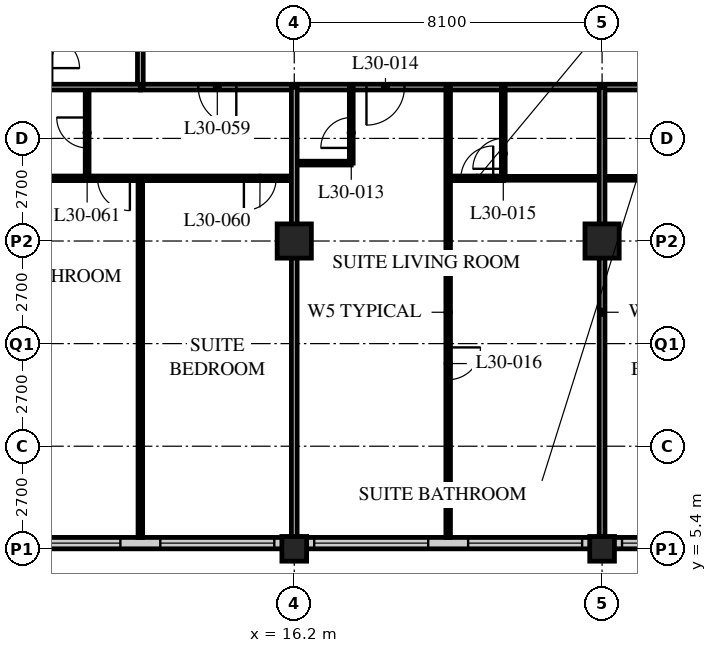
"""IFC4 building model, lengths in metres.
Left out: names, types, materials, properties, quantities, classifications, styles, units other than length and angle.
Written with IfcOpenShell. Run it as: python <this file> out.ifc"""

import sys

from ifc_helpers import new_model, si_unit, direction, frame, frame_2d, origin, origin_2d, place, context, subcontext, project, spatial, rectangle, hollow_rectangle, extrude, element, fill, save


model = new_model("IFC4")
c1 = context("Model", 3, precision=1e-05, world=origin(), true_north=direction((0.0, 1.0)))
c2 = subcontext(c1, "Body", "Model", "MODEL_VIEW")
j1 = project(units=[si_unit("LENGTHUNIT", "METRE"), si_unit("PLANEANGLEUNIT", "RADIAN")], contexts=[c1])
p1 = place(None, origin())
s1 = spatial("IfcSite", under=j1, at=p1, CompositionType="ELEMENT")
p2 = place(p1, origin())
s2 = spatial("IfcBuilding", under=s1, at=p2, CompositionType="ELEMENT")
p3 = place(p2, frame((0.0, 0.0, 120.4)))
s3 = spatial("IfcBuildingStorey", under=s2, at=p3, CompositionType="ELEMENT", Elevation=120.4)
p4 = place(p3, frame((16.2, 5.4, 0.0), z_axis=(0.0, 0.0, 1.0), x_axis=(1.0, 0.0, 0.0)))
e1 = element("IfcColumn", 1, at=p4, inside=s3, PredefinedType="COLUMN", context=c2, shape_type="SweptSolid", body=[
    extrude(hollow_rectangle(XDim=0.65, YDim=0.65, WallThickness=0.055, at=origin_2d()), origin(), (0.0, 0.0, 1.0), 3.4),
])
p5 = place(p3, frame((16.2, 13.5, 0.0), z_axis=(0.0, 0.0, 1.0), x_axis=(1.0, 0.0, 0.0)))
e2 = element("IfcColumn", 2, at=p5, inside=s3, PredefinedType="COLUMN", context=c2, shape_type="SweptSolid", body=[
    extrude(hollow_rectangle(XDim=0.9, YDim=0.9, WallThickness=0.09, at=origin_2d()), origin(), (0.0, 0.0, 1.0), 3.4),
])
p6 = place(p3, frame((24.3, 5.4, 0.0), z_axis=(0.0, 0.0, 1.0), x_axis=(1.0, 0.0, 0.0)))
e3 = element("IfcColumn", 3, at=p6, inside=s3, PredefinedType="COLUMN", context=c2, shape_type="SweptSolid", body=[
    extrude(hollow_rectangle(XDim=0.65, YDim=0.65, WallThickness=0.055, at=origin_2d()), origin(), (0.0, 0.0, 1.0), 3.4),
])
p7 = place(p3, frame((24.3, 13.5, 0.0), z_axis=(0.0, 0.0, 1.0), x_axis=(1.0, 0.0, 0.0)))
e4 = element("IfcColumn", 4, at=p7, inside=s3, PredefinedType="COLUMN", context=c2, shape_type="SweptSolid", body=[
    extrude(hollow_rectangle(XDim=0.9, YDim=0.9, WallThickness=0.09, at=origin_2d()), origin(), (0.0, 0.0, 1.0), 3.4),
])
p8 = place(p3, frame((8.4, 5.55, 0.0), z_axis=(0.0, 0.0, 1.0), x_axis=(1.0, 0.0, 0.0)))
e5 = element("IfcWall", 5, at=p8, inside=s3, PredefinedType="SOLIDWALL", context=c2, shape_type="SweptSolid", body=[
    extrude(rectangle(XDim=40.2, YDim=0.3, at=frame_2d((20.1, 0.0))), origin(), (0.0, 0.0, 1.0), 3.19),
])
p9 = place(p8, frame((0.225, 0.0, 0.9)))
e6 = element("IfcOpeningElement", 6, at=p9, cuts=e5, PredefinedType="OPENING", context=c2, shape_type="SweptSolid", body=[
    extrude(rectangle(XDim=3.0, YDim=2.0, at=frame_2d((1.5, 1.0))), frame((0.0, 0.16, 0.0), z_axis=(0.0, -1.0, 0.0), x_axis=(1.0, 0.0, 0.0)), (0.0, 0.0, 1.0), 0.32),
])
p10 = place(p8, frame((4.275, 0.0, 0.9)))
e7 = element("IfcOpeningElement", 7, at=p10, cuts=e5, PredefinedType="OPENING", context=c2, shape_type="SweptSolid", body=[
    extrude(rectangle(XDim=3.0, YDim=2.0, at=frame_2d((1.5, 1.0))), frame((0.0, 0.16, 0.0), z_axis=(0.0, -1.0, 0.0), x_axis=(1.0, 0.0, 0.0)), (0.0, 0.0, 1.0), 0.32),
])
p11 = place(p8, frame((8.325, 0.0, 0.9)))
e8 = element("IfcOpeningElement", 8, at=p11, cuts=e5, PredefinedType="OPENING", context=c2, shape_type="SweptSolid", body=[
    extrude(rectangle(XDim=3.0, YDim=2.0, at=frame_2d((1.5, 1.0))), frame((0.0, 0.16, 0.0), z_axis=(0.0, -1.0, 0.0), x_axis=(1.0, 0.0, 0.0)), (0.0, 0.0, 1.0), 0.32),
])
p12 = place(p8, frame((12.375, 0.0, 0.9)))
e9 = element("IfcOpeningElement", 9, at=p12, cuts=e5, PredefinedType="OPENING", context=c2, shape_type="SweptSolid", body=[
    extrude(rectangle(XDim=3.0, YDim=2.0, at=frame_2d((1.5, 1.0))), frame((0.0, 0.16, 0.0), z_axis=(0.0, -1.0, 0.0), x_axis=(1.0, 0.0, 0.0)), (0.0, 0.0, 1.0), 0.32),
])
p13 = place(p8, frame((16.425, 0.0, 0.9)))
e10 = element("IfcOpeningElement", 10, at=p13, cuts=e5, PredefinedType="OPENING", context=c2, shape_type="SweptSolid", body=[
    extrude(rectangle(XDim=3.0, YDim=2.0, at=frame_2d((1.5, 1.0))), frame((0.0, 0.16, 0.0), z_axis=(0.0, -1.0, 0.0), x_axis=(1.0, 0.0, 0.0)), (0.0, 0.0, 1.0), 0.32),
])
p14 = place(p8, frame((20.475, 0.0, 0.9)))
e11 = element("IfcOpeningElement", 11, at=p14, cuts=e5, PredefinedType="OPENING", context=c2, shape_type="SweptSolid", body=[
    extrude(rectangle(XDim=3.0, YDim=2.0, at=frame_2d((1.5, 1.0))), frame((0.0, 0.16, 0.0), z_axis=(0.0, -1.0, 0.0), x_axis=(1.0, 0.0, 0.0)), (0.0, 0.0, 1.0), 0.32),
])
p15 = place(p8, frame((24.525, 0.0, 0.9)))
e12 = element("IfcOpeningElement", 12, at=p15, cuts=e5, PredefinedType="OPENING", context=c2, shape_type="SweptSolid", body=[
    extrude(rectangle(XDim=3.0, YDim=2.0, at=frame_2d((1.5, 1.0))), frame((0.0, 0.16, 0.0), z_axis=(0.0, -1.0, 0.0), x_axis=(1.0, 0.0, 0.0)), (0.0, 0.0, 1.0), 0.32),
])
p16 = place(p8, frame((28.575, 0.0, 0.9)))
e13 = element("IfcOpeningElement", 13, at=p16, cuts=e5, PredefinedType="OPENING", context=c2, shape_type="SweptSolid", body=[
    extrude(rectangle(XDim=3.0, YDim=2.0, at=frame_2d((1.5, 1.0))), frame((0.0, 0.16, 0.0), z_axis=(0.0, -1.0, 0.0), x_axis=(1.0, 0.0, 0.0)), (0.0, 0.0, 1.0), 0.32),
])
p17 = place(p8, frame((32.625, 0.0, 0.9)))
e14 = element("IfcOpeningElement", 14, at=p17, cuts=e5, PredefinedType="OPENING", context=c2, shape_type="SweptSolid", body=[
    extrude(rectangle(XDim=3.0, YDim=2.0, at=frame_2d((1.5, 1.0))), frame((0.0, 0.16, 0.0), z_axis=(0.0, -1.0, 0.0), x_axis=(1.0, 0.0, 0.0)), (0.0, 0.0, 1.0), 0.32),
])
p18 = place(p8, frame((36.675, 0.0, 0.9)))
e15 = element("IfcOpeningElement", 15, at=p18, cuts=e5, PredefinedType="OPENING", context=c2, shape_type="SweptSolid", body=[
    extrude(rectangle(XDim=3.0, YDim=2.0, at=frame_2d((1.5, 1.0))), frame((0.0, 0.16, 0.0), z_axis=(0.0, -1.0, 0.0), x_axis=(1.0, 0.0, 0.0)), (0.0, 0.0, 1.0), 0.32),
])
p19 = place(p3, frame((12.15, 17.55, 0.0), z_axis=(0.0, 0.0, 1.0), x_axis=(1.0, 0.0, 0.0)))
e16 = element("IfcWall", 16, at=p19, inside=s3, PredefinedType="PARTITIONING", context=c2, shape_type="SweptSolid", body=[
    extrude(rectangle(XDim=32.4, YDim=0.15, at=frame_2d((16.2, 0.0))), origin(), (0.0, 0.0, 1.0), 3.19),
])
p20 = place(p19, frame((5.95, 0.0, 0.0)))
e17 = element("IfcOpeningElement", 17, at=p20, cuts=e16, PredefinedType="OPENING", context=c2, shape_type="SweptSolid", body=[
    extrude(rectangle(XDim=1.0, YDim=2.1, at=frame_2d((0.5, 1.05))), frame((0.0, 0.085, 0.0), z_axis=(0.0, -1.0, 0.0), x_axis=(1.0, 0.0, 0.0)), (0.0, 0.0, 1.0), 0.17),
])
p21 = place(p19, frame((17.725, 0.0, 0.0)))
e18 = element("IfcOpeningElement", 18, at=p21, cuts=e16, PredefinedType="OPENING", context=c2, shape_type="SweptSolid", body=[
    extrude(rectangle(XDim=1.0, YDim=2.1, at=frame_2d((0.5, 1.05))), frame((0.0, 0.085, 0.0), z_axis=(0.0, -1.0, 0.0), x_axis=(1.0, 0.0, 0.0)), (0.0, 0.0, 1.0), 0.17),
])
p22 = place(p19, frame((26.75, 0.0, 0.0)))
e19 = element("IfcOpeningElement", 19, at=p22, cuts=e16, PredefinedType="OPENING", context=c2, shape_type="SweptSolid", body=[
    extrude(rectangle(XDim=1.0, YDim=2.1, at=frame_2d((0.5, 1.05))), frame((0.0, 0.085, 0.0), z_axis=(0.0, -1.0, 0.0), x_axis=(1.0, 0.0, 0.0)), (0.0, 0.0, 1.0), 0.17),
])
p23 = place(p19, frame((1.525, 0.0, 0.0)))
e20 = element("IfcOpeningElement", 20, at=p23, cuts=e16, PredefinedType="OPENING", context=c2, shape_type="SweptSolid", body=[
    extrude(rectangle(XDim=1.0, YDim=2.1, at=frame_2d((0.5, 1.05))), frame((0.0, 0.085, 0.0), z_axis=(0.0, -1.0, 0.0), x_axis=(1.0, 0.0, 0.0)), (0.0, 0.0, 1.0), 0.17),
])
p24 = place(p19, frame((29.875, 0.0, 0.0)))
e21 = element("IfcOpeningElement", 21, at=p24, cuts=e16, PredefinedType="OPENING", context=c2, shape_type="SweptSolid", body=[
    extrude(rectangle(XDim=1.0, YDim=2.1, at=frame_2d((0.5, 1.05))), frame((0.0, 0.085, 0.0), z_axis=(0.0, -1.0, 0.0), x_axis=(1.0, 0.0, 0.0)), (0.0, 0.0, 1.0), 0.17),
])
p25 = place(p3, frame((12.15, 17.55, 0.0), z_axis=(0.0, 0.0, 1.0), x_axis=(0.0, 1.0, 0.0)))
e22 = element("IfcWall", 22, at=p25, inside=s3, PredefinedType="PARTITIONING", context=c2, shape_type="SweptSolid", body=[
    extrude(rectangle(XDim=28.35, YDim=0.15, at=frame_2d((14.175, 0.0))), origin(), (0.0, 0.0, 1.0), 3.19),
])
p26 = place(p25, frame((5.45, 0.0, 0.0)))
e23 = element("IfcOpeningElement", 23, at=p26, cuts=e22, PredefinedType="OPENING", context=c2, shape_type="SweptSolid", body=[
    extrude(rectangle(XDim=1.0, YDim=2.1, at=frame_2d((0.5, 1.05))), frame((0.0, 0.085, 0.0), z_axis=(0.0, -1.0, 0.0), x_axis=(1.0, 0.0, 0.0)), (0.0, 0.0, 1.0), 0.17),
])
p27 = place(p25, frame((13.55, 0.0, 0.0)))
e24 = element("IfcOpeningElement", 24, at=p27, cuts=e22, PredefinedType="OPENING", context=c2, shape_type="SweptSolid", body=[
    extrude(rectangle(XDim=1.0, YDim=2.1, at=frame_2d((0.5, 1.05))), frame((0.0, 0.085, 0.0), z_axis=(0.0, -1.0, 0.0), x_axis=(1.0, 0.0, 0.0)), (0.0, 0.0, 1.0), 0.17),
])
p28 = place(p25, frame((21.65, 0.0, 0.0)))
e25 = element("IfcOpeningElement", 25, at=p28, cuts=e22, PredefinedType="OPENING", context=c2, shape_type="SweptSolid", body=[
    extrude(rectangle(XDim=1.0, YDim=2.1, at=frame_2d((0.5, 1.05))), frame((0.0, 0.085, 0.0), z_axis=(0.0, -1.0, 0.0), x_axis=(1.0, 0.0, 0.0)), (0.0, 0.0, 1.0), 0.17),
])
p29 = place(p25, frame((26.75, 0.0, 0.0)))
e26 = element("IfcOpeningElement", 26, at=p29, cuts=e22, PredefinedType="OPENING", context=c2, shape_type="SweptSolid", body=[
    extrude(rectangle(XDim=1.0, YDim=2.1, at=frame_2d((0.5, 1.05))), frame((0.0, 0.085, 0.0), z_axis=(0.0, -1.0, 0.0), x_axis=(1.0, 0.0, 0.0)), (0.0, 0.0, 1.0), 0.17),
])
p30 = place(p3, frame((16.2, 15.55, 0.0), z_axis=(0.0, 0.0, 1.0), x_axis=(1.0, 0.0, 0.0)))
e27 = element("IfcWall", 27, at=p30, inside=s3, PredefinedType="PARTITIONING", context=c2, shape_type="SweptSolid", body=[
    extrude(rectangle(XDim=1.5, YDim=0.1, at=frame_2d((0.75, 0.0))), origin(), (0.0, 0.0, 1.0), 3.19),
])
p31 = place(p3, frame((17.7, 17.55, 0.0), z_axis=(0.0, 0.0, 1.0), x_axis=(0.0, -1.0, 0.0)))
e28 = element("IfcWall", 28, at=p31, inside=s3, PredefinedType="PARTITIONING", context=c2, shape_type="SweptSolid", body=[
    extrude(rectangle(XDim=2.0, YDim=0.1, at=frame_2d((1.0, 0.0))), origin(), (0.0, 0.0, 1.0), 3.19),
])
p32 = place(p31, frame((0.8, 0.0, 0.0)))
e29 = element("IfcOpeningElement", 29, at=p32, cuts=e28, PredefinedType="OPENING", context=c2, shape_type="SweptSolid", body=[
    extrude(rectangle(XDim=0.8, YDim=2.1, at=frame_2d((0.4, 1.05))), frame((0.0, 0.06, 0.0), z_axis=(0.0, -1.0, 0.0), x_axis=(1.0, 0.0, 0.0)), (0.0, 0.0, 1.0), 0.12),
])
p33 = place(p3, frame((21.7, 15.15, 0.0), z_axis=(0.0, 0.0, 1.0), x_axis=(1.0, 0.0, 0.0)))
e30 = element("IfcWall", 30, at=p33, inside=s3, PredefinedType="PARTITIONING", context=c2, shape_type="SweptSolid", body=[
    extrude(rectangle(XDim=5.2, YDim=0.1, at=frame_2d((2.6, 0.0))), origin(), (0.0, 0.0, 1.0), 3.19),
])
p34 = place(p3, frame((21.7, 17.55, 0.0), z_axis=(0.0, 0.0, 1.0), x_axis=(0.0, -1.0, 0.0)))
e31 = element("IfcWall", 31, at=p34, inside=s3, PredefinedType="PARTITIONING", context=c2, shape_type="SweptSolid", body=[
    extrude(rectangle(XDim=2.4, YDim=0.1, at=frame_2d((1.2, 0.0))), origin(), (0.0, 0.0, 1.0), 3.19),
])
p35 = place(p34, frame((1.35, 0.0, 0.0)))
e32 = element("IfcOpeningElement", 32, at=p35, cuts=e31, PredefinedType="OPENING", context=c2, shape_type="SweptSolid", body=[
    extrude(rectangle(XDim=0.8, YDim=2.1, at=frame_2d((0.4, 1.05))), frame((0.0, 0.06, 0.0), z_axis=(0.0, -1.0, 0.0), x_axis=(1.0, 0.0, 0.0)), (0.0, 0.0, 1.0), 0.12),
])
p36 = place(p3, frame((20.25, 17.55, 0.0), z_axis=(0.0, 0.0, 1.0), x_axis=(0.0, -1.0, 0.0)))
e33 = element("IfcWall", 33, at=p36, inside=s3, PredefinedType="PARTITIONING", context=c2, shape_type="SweptSolid", body=[
    extrude(rectangle(XDim=11.85, YDim=0.12, at=frame_2d((5.925, 0.0))), origin(), (0.0, 0.0, 1.0), 3.19),
])
p37 = place(p36, frame((6.85, 0.0, 0.0)))
e34 = element("IfcOpeningElement", 34, at=p37, cuts=e33, PredefinedType="OPENING", context=c2, shape_type="SweptSolid", body=[
    extrude(rectangle(XDim=0.85, YDim=2.1, at=frame_2d((0.425, 1.05))), frame((0.0, 0.07, 0.0), z_axis=(0.0, -1.0, 0.0), x_axis=(1.0, 0.0, 0.0)), (0.0, 0.0, 1.0), 0.14),
])
p38 = place(p3, frame((24.3, 17.55, 0.0), z_axis=(0.0, 0.0, 1.0), x_axis=(0.0, -1.0, 0.0)))
e35 = element("IfcWall", 35, at=p38, inside=s3, PredefinedType="PARTITIONING", context=c2, shape_type="SweptSolid", body=[
    extrude(rectangle(XDim=11.85, YDim=0.15, at=frame_2d((5.925, 0.0))), origin(), (0.0, 0.0, 1.0), 2.578),
])
p39 = place(p3, frame((10.75, 17.55, 0.0), z_axis=(0.0, 0.0, 1.0), x_axis=(0.0, -1.0, 0.0)))
e36 = element("IfcWall", 36, at=p39, inside=s3, PredefinedType="PARTITIONING", context=c2, shape_type="SweptSolid", body=[
    extrude(rectangle(XDim=2.4, YDim=0.1, at=frame_2d((1.2, 0.0))), origin(), (0.0, 0.0, 1.0), 3.19),
])
p40 = place(p39, frame((0.8, 0.0, 0.0)))
e37 = element("IfcOpeningElement", 37, at=p40, cuts=e36, PredefinedType="OPENING", context=c2, shape_type="SweptSolid", body=[
    extrude(rectangle(XDim=0.8, YDim=2.1, at=frame_2d((0.4, 1.05))), frame((0.0, 0.06, 0.0), z_axis=(0.0, -1.0, 0.0), x_axis=(1.0, 0.0, 0.0)), (0.0, 0.0, 1.0), 0.12),
])
p41 = place(p3, frame((8.15, 15.15, 0.0), z_axis=(0.0, 0.0, 1.0), x_axis=(1.0, 0.0, 0.0)))
e38 = element("IfcWall", 38, at=p41, inside=s3, PredefinedType="PARTITIONING", context=c2, shape_type="SweptSolid", body=[
    extrude(rectangle(XDim=8.05, YDim=0.12, at=frame_2d((4.025, 0.0))), origin(), (0.0, 0.0, 1.0), 3.19),
])
p42 = place(p41, frame((6.725, 0.0, 0.0)))
e39 = element("IfcOpeningElement", 39, at=p42, cuts=e38, PredefinedType="OPENING", context=c2, shape_type="SweptSolid", body=[
    extrude(rectangle(XDim=0.85, YDim=2.1, at=frame_2d((0.425, 1.05))), frame((0.0, 0.07, 0.0), z_axis=(0.0, -1.0, 0.0), x_axis=(1.0, 0.0, 0.0)), (0.0, 0.0, 1.0), 0.14),
])
p43 = place(p41, frame((2.875, 0.0, 0.0)))
e40 = element("IfcOpeningElement", 40, at=p43, cuts=e38, PredefinedType="OPENING", context=c2, shape_type="SweptSolid", body=[
    extrude(rectangle(XDim=0.85, YDim=2.1, at=frame_2d((0.425, 1.05))), frame((0.0, 0.07, 0.0), z_axis=(0.0, -1.0, 0.0), x_axis=(1.0, 0.0, 0.0)), (0.0, 0.0, 1.0), 0.14),
])
p44 = place(p3, frame((12.15, 15.15, 0.0), z_axis=(0.0, 0.0, 1.0), x_axis=(0.0, -1.0, 0.0)))
e41 = element("IfcWall", 41, at=p44, inside=s3, PredefinedType="PARTITIONING", context=c2, shape_type="SweptSolid", body=[
    extrude(rectangle(XDim=9.45, YDim=0.12, at=frame_2d((4.725, 0.0))), origin(), (0.0, 0.0, 1.0), 3.19),
])
p45 = place(p3, frame((0.3, 17.55, 0.0), z_axis=(0.0, 0.0, 1.0), x_axis=(1.0, 0.0, 0.0)))
e42 = element("IfcWall", 42, at=p45, inside=s3, PredefinedType="PARTITIONING", context=c2, shape_type="SweptSolid", body=[
    extrude(rectangle(XDim=11.85, YDim=0.15, at=frame_2d((5.925, 0.0))), origin(), (0.0, 0.0, 1.0), 3.19),
])
p46 = place(p3, frame((16.2, 17.55, 0.0), z_axis=(0.0, 0.0, 1.0), x_axis=(0.0, -1.0, 0.0)))
e43 = element("IfcWall", 43, at=p46, inside=s3, PredefinedType="PARTITIONING", context=c2, shape_type="SweptSolid", body=[
    extrude(rectangle(XDim=11.85, YDim=0.15, at=frame_2d((5.925, 0.0))), origin(), (0.0, 0.0, 1.0), 2.578),
])
p47 = place(p3, frame((21.71, 15.15, 0.0), z_axis=(0.0, 0.0, 1.0), x_axis=(-1.0, 0.0, 0.0)))
e44 = element("IfcWall", 44, at=p47, inside=s3, PredefinedType="PARTITIONING", context=c2, shape_type="SweptSolid", body=[
    extrude(rectangle(XDim=1.46, YDim=0.12, at=frame_2d((0.73, 0.0))), origin(), (0.0, 0.0, 1.0), 3.19),
])
p48 = place(p47, frame((0.275, 0.0, 0.0)))
e45 = element("IfcOpeningElement", 45, at=p48, cuts=e44, PredefinedType="OPENING", context=c2, shape_type="SweptSolid", body=[
    extrude(rectangle(XDim=0.85, YDim=2.1, at=frame_2d((0.425, 1.05))), frame((0.0, 0.07, 0.0), z_axis=(0.0, -1.0, 0.0), x_axis=(1.0, 0.0, 0.0)), (0.0, 0.0, 1.0), 0.14),
])
p49 = place(p9, origin())
e46 = element("IfcWindow", 46, at=p49, inside=s3, PartitioningType="SINGLE_PANEL", PredefinedType="WINDOW", context=c2, shape_type="SweptSolid", body=[
    extrude(rectangle(XDim=3.0, YDim=2.0, at=frame_2d((1.5, 1.0))), frame((0.0, 0.03, 0.0), z_axis=(0.0, -1.0, 0.0), x_axis=(1.0, 0.0, 0.0)), (0.0, 0.0, 1.0), 0.06),
])
fill(e6, e46)
p50 = place(p10, origin())
e47 = element("IfcWindow", 47, at=p50, inside=s3, PartitioningType="SINGLE_PANEL", PredefinedType="WINDOW", context=c2, shape_type="SweptSolid", body=[
    extrude(rectangle(XDim=3.0, YDim=2.0, at=frame_2d((1.5, 1.0))), frame((0.0, 0.03, 0.0), z_axis=(0.0, -1.0, 0.0), x_axis=(1.0, 0.0, 0.0)), (0.0, 0.0, 1.0), 0.06),
])
fill(e7, e47)
p51 = place(p11, origin())
e48 = element("IfcWindow", 48, at=p51, inside=s3, PartitioningType="SINGLE_PANEL", PredefinedType="WINDOW", context=c2, shape_type="SweptSolid", body=[
    extrude(rectangle(XDim=3.0, YDim=2.0, at=frame_2d((1.5, 1.0))), frame((0.0, 0.03, 0.0), z_axis=(0.0, -1.0, 0.0), x_axis=(1.0, 0.0, 0.0)), (0.0, 0.0, 1.0), 0.06),
])
fill(e8, e48)
p52 = place(p12, origin())
e49 = element("IfcWindow", 49, at=p52, inside=s3, PartitioningType="SINGLE_PANEL", PredefinedType="WINDOW", context=c2, shape_type="SweptSolid", body=[
    extrude(rectangle(XDim=3.0, YDim=2.0, at=frame_2d((1.5, 1.0))), frame((0.0, 0.03, 0.0), z_axis=(0.0, -1.0, 0.0), x_axis=(1.0, 0.0, 0.0)), (0.0, 0.0, 1.0), 0.06),
])
fill(e9, e49)
p53 = place(p13, origin())
e50 = element("IfcWindow", 50, at=p53, inside=s3, PartitioningType="SINGLE_PANEL", PredefinedType="WINDOW", context=c2, shape_type="SweptSolid", body=[
    extrude(rectangle(XDim=3.0, YDim=2.0, at=frame_2d((1.5, 1.0))), frame((0.0, 0.03, 0.0), z_axis=(0.0, -1.0, 0.0), x_axis=(1.0, 0.0, 0.0)), (0.0, 0.0, 1.0), 0.06),
])
fill(e10, e50)
p54 = place(p32, origin())
e51 = element("IfcDoor", 51, at=p54, inside=s3, OperationType="SINGLE_SWING_LEFT", PredefinedType="DOOR", context=c2, shape_type="SweptSolid", body=[
    extrude(rectangle(XDim=0.8, YDim=2.1, at=frame_2d((0.4, 1.05))), frame((0.0, 0.025, 0.0), z_axis=(0.0, -1.0, 0.0), x_axis=(1.0, 0.0, 0.0)), (0.0, 0.0, 1.0), 0.05),
])
fill(e29, e51)
p55 = place(p20, origin())
e52 = element("IfcDoor", 52, at=p55, inside=s3, OperationType="SINGLE_SWING_RIGHT", PredefinedType="DOOR", context=c2, shape_type="SweptSolid", body=[
    extrude(rectangle(XDim=1.0, YDim=2.1, at=frame_2d((0.5, 1.05))), frame((0.0, 0.025, 0.0), z_axis=(0.0, -1.0, 0.0), x_axis=(1.0, 0.0, 0.0)), (0.0, 0.0, 1.0), 0.05),
])
fill(e17, e52)
p56 = place(p35, origin())
e53 = element("IfcDoor", 53, at=p56, inside=s3, OperationType="SINGLE_SWING_LEFT", PredefinedType="DOOR", context=c2, shape_type="SweptSolid", body=[
    extrude(rectangle(XDim=0.8, YDim=2.1, at=frame_2d((0.4, 1.05))), frame((0.0, 0.025, 0.0), z_axis=(0.0, -1.0, 0.0), x_axis=(1.0, 0.0, 0.0)), (0.0, 0.0, 1.0), 0.05),
])
fill(e32, e53)
p57 = place(p37, origin())
e54 = element("IfcDoor", 54, at=p57, inside=s3, OperationType="SINGLE_SWING_LEFT", PredefinedType="DOOR", context=c2, shape_type="SweptSolid", body=[
    extrude(rectangle(XDim=0.85, YDim=2.1, at=frame_2d((0.425, 1.05))), frame((0.0, 0.025, 0.0), z_axis=(0.0, -1.0, 0.0), x_axis=(1.0, 0.0, 0.0)), (0.0, 0.0, 1.0), 0.05),
])
fill(e34, e54)
p58 = place(p23, origin())
e55 = element("IfcDoor", 55, at=p58, inside=s3, OperationType="SINGLE_SWING_LEFT", PredefinedType="DOOR", context=c2, shape_type="SweptSolid", body=[
    extrude(rectangle(XDim=1.0, YDim=2.1, at=frame_2d((0.5, 1.05))), frame((0.0, 0.025, 0.0), z_axis=(0.0, -1.0, 0.0), x_axis=(1.0, 0.0, 0.0)), (0.0, 0.0, 1.0), 0.05),
])
fill(e20, e55)
p59 = place(p42, origin())
e56 = element("IfcDoor", 56, at=p59, inside=s3, OperationType="SINGLE_SWING_RIGHT", PredefinedType="DOOR", context=c2, shape_type="SweptSolid", body=[
    extrude(rectangle(XDim=0.85, YDim=2.1, at=frame_2d((0.425, 1.05))), frame((0.0, 0.025, 0.0), z_axis=(0.0, -1.0, 0.0), x_axis=(1.0, 0.0, 0.0)), (0.0, 0.0, 1.0), 0.05),
])
fill(e39, e56)
p60 = place(p40, origin())
e57 = element("IfcDoor", 57, at=p60, inside=s3, OperationType="SINGLE_SWING_RIGHT", PredefinedType="DOOR", context=c2, shape_type="SweptSolid", body=[
    extrude(rectangle(XDim=0.8, YDim=2.1, at=frame_2d((0.4, 1.05))), frame((0.0, 0.025, 0.0), z_axis=(0.0, -1.0, 0.0), x_axis=(1.0, 0.0, 0.0)), (0.0, 0.0, 1.0), 0.05),
])
fill(e37, e57)
p61 = place(p43, origin())
e58 = element("IfcDoor", 58, at=p61, inside=s3, OperationType="SINGLE_SWING_LEFT", PredefinedType="DOOR", context=c2, shape_type="SweptSolid", body=[
    extrude(rectangle(XDim=0.85, YDim=2.1, at=frame_2d((0.425, 1.05))), frame((0.0, 0.025, 0.0), z_axis=(0.0, -1.0, 0.0), x_axis=(1.0, 0.0, 0.0)), (0.0, 0.0, 1.0), 0.05),
])
fill(e40, e58)
p62 = place(p48, origin())
e59 = element("IfcDoor", 59, at=p62, inside=s3, OperationType="SINGLE_SWING_RIGHT", PredefinedType="DOOR", context=c2, shape_type="SweptSolid", body=[
    extrude(rectangle(XDim=0.85, YDim=2.1, at=frame_2d((0.425, 1.05))), frame((0.0, 0.025, 0.0), z_axis=(0.0, -1.0, 0.0), x_axis=(1.0, 0.0, 0.0)), (0.0, 0.0, 1.0), 0.05),
])
fill(e45, e59)
save(model, sys.argv[1])
